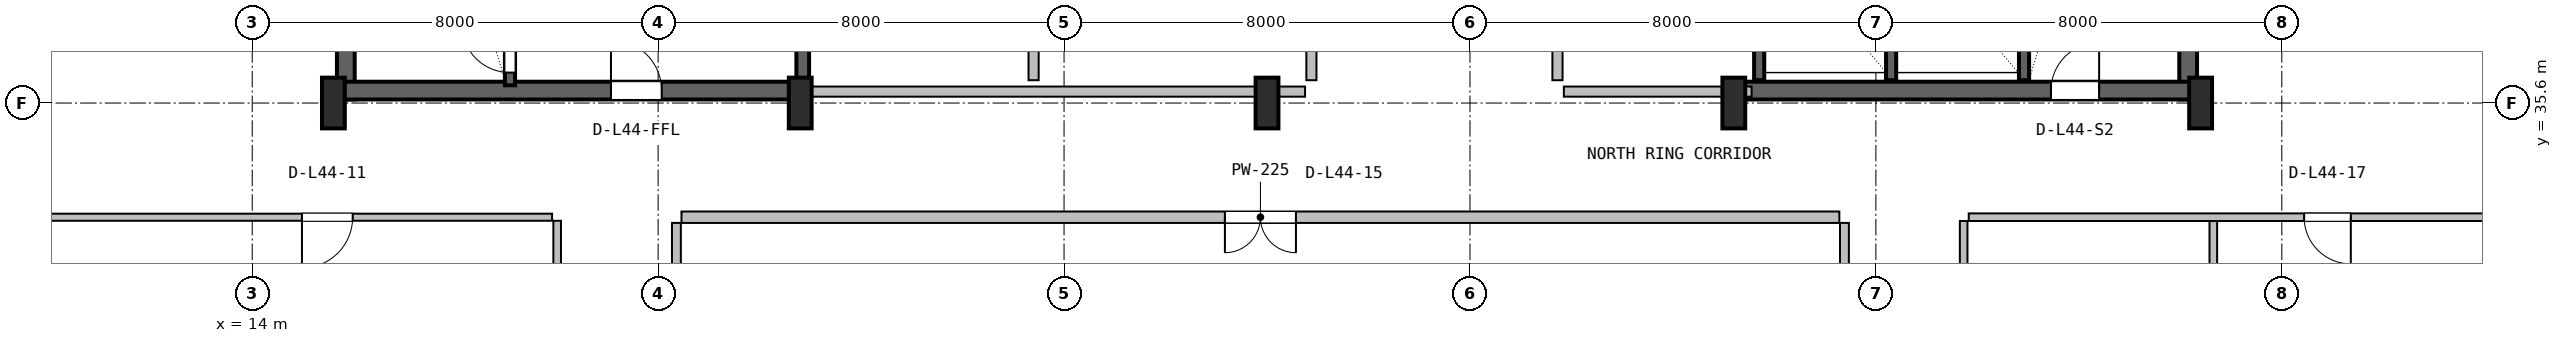
"""IFC4 building model, lengths in metres.
Left out: names, types, materials, properties, quantities, classifications, styles, units other than length and angle.
Written with IfcOpenShell. Run it as: python <this file> out.ifc"""

import sys

from ifc_helpers import new_model, si_unit, direction, frame, frame_2d, origin, origin_2d, place, context, subcontext, project, spatial, rectangle, i_section, extrude, source, transform, mapped, element, fill, save


model = new_model("IFC4")
c1 = context("Model", 3, precision=1e-05, world=origin(), true_north=direction((0.0, 1.0)))
c2 = subcontext(c1, "Body", "Model", "MODEL_VIEW")
j1 = project(units=[si_unit("LENGTHUNIT", "METRE"), si_unit("PLANEANGLEUNIT", "RADIAN")], contexts=[c1])
p1 = place(None, origin())
s1 = spatial("IfcSite", under=j1, at=p1, CompositionType="ELEMENT")
p2 = place(p1, origin())
s2 = spatial("IfcBuilding", under=s1, at=p2, CompositionType="ELEMENT")
p3 = place(p2, frame((0.0, 0.0, 180.0)))
s3 = spatial("IfcBuildingStorey", under=s2, at=p3, CompositionType="ELEMENT", Elevation=180.0)
for number, where, z_axis, x_axis in (
    (1, (15.845, 35.67, 0.0), (0.0, 0.0, 1.0), (0.0, 1.0, 0.0)),
    (2, (52.155, 35.67, 0.0), (0.0, 0.0, 1.0), (0.0, 1.0, 0.0)),
):
    element("IfcWall", number, at=place(p3, frame(where, z_axis=z_axis, x_axis=x_axis)), inside=s3, PredefinedType="SHEAR", context=c2, shape_type="SweptSolid", body=[
        extrude(rectangle(XDim=11.13, YDim=0.35, at=frame_2d((5.565, 0.0))), origin(), (0.0, 0.0, 1.0), 3.55),
    ])
p4 = place(p3, frame((15.67, 35.845, 0.0), z_axis=(0.0, 0.0, 1.0), x_axis=(1.0, 0.0, 0.0)))
e3 = element("IfcWall", 3, at=p4, inside=s3, PredefinedType="SHEAR", context=c2, shape_type="SweptSolid", body=[
    extrude(rectangle(XDim=9.13, YDim=0.35, at=frame_2d((4.565, 0.0))), origin(), (0.0, 0.0, 1.0), 3.55),
])
p5 = place(p4, frame((5.4, 0.0, 0.0)))
e4 = element("IfcOpeningElement", 4, at=p5, cuts=e3, PredefinedType="OPENING", context=c2, shape_type="SweptSolid", body=[
    extrude(rectangle(XDim=1.0, YDim=2.1, at=frame_2d((0.5, 1.05))), frame((0.0, 0.185, 0.0), z_axis=(0.0, -1.0, 0.0), x_axis=(1.0, 0.0, 0.0)), (0.0, 0.0, 1.0), 0.37),
])
p6 = place(p3, frame((43.2, 35.845, 0.0), z_axis=(0.0, 0.0, 1.0), x_axis=(1.0, 0.0, 0.0)))
e5 = element("IfcWall", 5, at=p6, inside=s3, PredefinedType="SHEAR", context=c2, shape_type="SweptSolid", body=[
    extrude(rectangle(XDim=9.13, YDim=0.35, at=frame_2d((4.565, 0.0))), origin(), (0.0, 0.0, 1.0), 3.55),
])
p7 = place(p6, frame((6.25, 0.0, 0.0)))
e6 = element("IfcOpeningElement", 6, at=p7, cuts=e5, PredefinedType="OPENING", context=c2, shape_type="SweptSolid", body=[
    extrude(rectangle(XDim=0.95, YDim=2.1, at=frame_2d((0.475, 1.05))), frame((0.0, 0.185, 0.0), z_axis=(0.0, -1.0, 0.0), x_axis=(1.0, 0.0, 0.0)), (0.0, 0.0, 1.0), 0.37),
])
m1 = source(origin(), c2, "Body", "SweptSolid", [
    extrude(i_section(OverallWidth=0.45, OverallDepth=1.0, WebThickness=0.016, FlangeThickness=0.03, FilletRadius=0.016, at=origin_2d()), origin(), (0.0, 0.0, 1.0), 3.8),
])
for number, where, z_axis, x_axis in (
    (7, (15.6, 35.6, 0.0), (0.0, 0.0, 1.0), (1.0, 0.0, 0.0)),
    (8, (24.8, 35.6, 0.0), (0.0, 0.0, 1.0), (1.0, 0.0, 0.0)),
    (9, (34.0, 35.6, 0.0), (0.0, 0.0, 1.0), (1.0, 0.0, 0.0)),
    (10, (43.2, 35.6, 0.0), (0.0, 0.0, 1.0), (1.0, 0.0, 0.0)),
    (11, (52.4, 35.6, 0.0), (0.0, 0.0, 1.0), (1.0, 0.0, 0.0)),
):
    element("IfcColumn", number, at=place(p3, frame(where, z_axis=z_axis, x_axis=x_axis)), inside=s3, PredefinedType="COLUMN", context=c2, shape_type="MappedRepresentation", body=[
        mapped(m1, transform((0.0, 0.0, 0.0), x_axis=(1.0, 0.0, 0.0), y_axis=(0.0, 1.0, 0.0), z_axis=(0.0, 0.0, 1.0), scale=1.0)),
    ])
p8 = place(p3, frame((19.08, 35.95, 0.0), z_axis=(0.0, 0.0, 1.0), x_axis=(0.0, 1.0, 0.0)))
e12 = element("IfcWall", 12, at=p8, inside=s3, PredefinedType="SHEAR", context=c2, shape_type="SweptSolid", body=[
    extrude(rectangle(XDim=9.65, YDim=0.2, at=frame_2d((4.825, 0.0))), origin(), (0.0, 0.0, 1.0), 3.55),
])
p9 = place(p8, frame((0.25, 0.0, 0.0)))
e13 = element("IfcOpeningElement", 13, at=p9, cuts=e12, PredefinedType="OPENING", context=c2, shape_type="SweptSolid", body=[
    extrude(rectangle(XDim=0.95, YDim=2.1, at=frame_2d((0.475, 1.05))), frame((0.0, 0.11, 0.0), z_axis=(0.0, -1.0, 0.0), x_axis=(1.0, 0.0, 0.0)), (0.0, 0.0, 1.0), 0.22),
])
p10 = place(p3, frame((24.85, 36.05, 0.0), z_axis=(0.0, 0.0, 1.0), x_axis=(0.0, 1.0, 0.0)))
e14 = element("IfcWall", 14, at=p10, inside=s3, PredefinedType="SHEAR", context=c2, shape_type="SweptSolid", body=[
    extrude(rectangle(XDim=10.45, YDim=0.25, at=frame_2d((5.225, 0.0))), origin(), (0.0, 0.0, 1.0), 3.55),
])
p11 = place(p3, frame((48.92, 36.05, 0.0), z_axis=(0.0, 0.0, 1.0), x_axis=(0.0, 1.0, 0.0)))
e15 = element("IfcWall", 15, at=p11, inside=s3, PredefinedType="SHEAR", context=c2, shape_type="SweptSolid", body=[
    extrude(rectangle(XDim=10.5, YDim=0.2, at=frame_2d((5.25, 0.0))), origin(), (0.0, 0.0, 1.0), 3.55),
])
for number, where, z_axis, x_axis in (
    (16, (43.7, 36.05, 0.0), (0.0, 0.0, 1.0), (0.0, 1.0, 0.0)),
    (17, (46.3, 36.05, 0.0), (0.0, 0.0, 1.0), (0.0, 1.0, 0.0)),
):
    element("IfcWall", number, at=place(p3, frame(where, z_axis=z_axis, x_axis=x_axis)), inside=s3, PredefinedType="SHEAR", context=c2, shape_type="SweptSolid", body=[
        extrude(rectangle(XDim=3.05, YDim=0.2, at=frame_2d((1.525, 0.0))), origin(), (0.0, 0.0, 1.0), 3.55),
    ])
p12 = place(p3, frame((25.0, 35.825, 0.0), z_axis=(0.0, 0.0, 1.0), x_axis=(1.0, 0.0, 0.0)))
e18 = element("IfcWall", 18, at=p12, inside=s3, PredefinedType="PLUMBINGWALL", context=c2, shape_type="SweptSolid", body=[
    extrude(rectangle(XDim=9.75, YDim=0.2, at=frame_2d((4.875, 0.0))), origin(), (0.0, 0.0, 1.0), 2.575),
])
for number, where, z_axis, x_axis in (
    (19, (29.4, 36.05, 0.0), (0.0, 0.0, 1.0), (0.0, 1.0, 0.0)),
    (20, (34.875, 36.05, 0.0), (0.0, 0.0, 1.0), (0.0, 1.0, 0.0)),
):
    element("IfcWall", number, at=place(p3, frame(where, z_axis=z_axis, x_axis=x_axis)), inside=s3, PredefinedType="PLUMBINGWALL", context=c2, shape_type="SweptSolid", body=[
        extrude(rectangle(XDim=3.1, YDim=0.2, at=frame_2d((1.55, 0.0))), origin(), (0.0, 0.0, 1.0), 3.53),
    ])
p13 = place(p3, frame((39.85, 35.825, 0.0), z_axis=(0.0, 0.0, 1.0), x_axis=(1.0, 0.0, 0.0)))
e21 = element("IfcWall", 21, at=p13, inside=s3, PredefinedType="SOLIDWALL", context=c2, shape_type="SweptSolid", body=[
    extrude(rectangle(XDim=3.7, YDim=0.2, at=frame_2d((1.85, 0.0))), origin(), (0.0, 0.0, 1.0), 2.575),
])
p14 = place(p3, frame((39.725, 36.05, 0.0), z_axis=(0.0, 0.0, 1.0), x_axis=(0.0, 1.0, 0.0)))
e22 = element("IfcWall", 22, at=p14, inside=s3, PredefinedType="SOLIDWALL", context=c2, shape_type="SweptSolid", body=[
    extrude(rectangle(XDim=3.1, YDim=0.2, at=frame_2d((1.55, 0.0))), origin(), (0.0, 0.0, 1.0), 3.53),
])
p15 = place(p3, frame((20.01, 15.06, 0.0), z_axis=(0.0, 0.0, 1.0), x_axis=(0.0, 1.0, 0.0)))
e23 = element("IfcWall", 23, at=p15, inside=s3, PredefinedType="PARTITIONING", context=c2, shape_type="SweptSolid", body=[
    extrude(rectangle(XDim=18.22, YDim=0.15, at=frame_2d((9.11, 0.0))), origin(), (0.0, 0.0, 1.0), 3.222),
])
p16 = place(p15, frame((1.67, 0.0, 0.0)))
e24 = element("IfcOpeningElement", 24, at=p16, cuts=e23, PredefinedType="OPENING", context=c2, shape_type="SweptSolid", body=[
    extrude(rectangle(XDim=0.88, YDim=2.06, at=frame_2d((0.44, 1.03))), frame((0.0, 0.085, 0.0), z_axis=(0.0, -1.0, 0.0), x_axis=(1.0, 0.0, 0.0)), (0.0, 0.0, 1.0), 0.17),
])
p17 = place(p15, frame((6.855, 0.0, 0.0)))
e25 = element("IfcOpeningElement", 25, at=p17, cuts=e23, PredefinedType="OPENING", context=c2, shape_type="SweptSolid", body=[
    extrude(rectangle(XDim=0.92, YDim=2.08, at=frame_2d((0.46, 1.04))), frame((0.0, 0.085, 0.0), z_axis=(0.0, -1.0, 0.0), x_axis=(1.0, 0.0, 0.0)), (0.0, 0.0, 1.0), 0.17),
])
p18 = place(p3, frame((7.18, 33.35, 0.0), z_axis=(0.0, 0.0, 1.0), x_axis=(1.0, 0.0, 0.0)))
e26 = element("IfcWall", 26, at=p18, inside=s3, PredefinedType="PARTITIONING", context=c2, shape_type="SweptSolid", body=[
    extrude(rectangle(XDim=12.73, YDim=0.14, at=frame_2d((6.365, 0.0))), origin(), (0.0, 0.0, 1.0), 3.108),
])
p19 = place(p18, frame((7.8, 0.0, 0.0)))
e27 = element("IfcOpeningElement", 27, at=p19, cuts=e26, PredefinedType="OPENING", context=c2, shape_type="SweptSolid", body=[
    extrude(rectangle(XDim=1.0, YDim=2.1, at=frame_2d((0.5, 1.05))), frame((0.0, 0.08, 0.0), z_axis=(0.0, -1.0, 0.0), x_axis=(1.0, 0.0, 0.0)), (0.0, 0.0, 1.0), 0.16),
])
p20 = place(p3, frame((45.38, 17.427, 0.0), z_axis=(0.0, 0.0, 1.0), x_axis=(0.0, 1.0, 0.0)))
e28 = element("IfcWall", 28, at=p20, inside=s3, PredefinedType="PARTITIONING", context=c2, shape_type="SweptSolid", body=[
    extrude(rectangle(XDim=15.811, YDim=0.175, at=frame_2d((7.906, 0.0))), origin(), (0.0, 0.0, 1.0), 3.222),
])
p21 = place(p20, frame((5.998, 0.0, 0.0)))
e29 = element("IfcOpeningElement", 29, at=p21, cuts=e28, PredefinedType="OPENING", context=c2, shape_type="SweptSolid", body=[
    extrude(rectangle(XDim=1.05, YDim=2.1, at=frame_2d((0.525, 1.05))), frame((0.0, 0.098, 0.0), z_axis=(0.0, -1.0, 0.0), x_axis=(1.0, 0.0, 0.0)), (0.0, 0.0, 1.0), 0.195),
])
p22 = place(p20, frame((9.948, 0.0, 0.0)))
e30 = element("IfcOpeningElement", 30, at=p22, cuts=e28, PredefinedType="OPENING", context=c2, shape_type="SweptSolid", body=[
    extrude(rectangle(XDim=1.05, YDim=2.1, at=frame_2d((0.525, 1.05))), frame((0.0, 0.098, 0.0), z_axis=(0.0, -1.0, 0.0), x_axis=(1.0, 0.0, 0.0)), (0.0, 0.0, 1.0), 0.195),
])
p23 = place(p3, frame((22.36, 17.427, 0.0), z_axis=(0.0, 0.0, 1.0), x_axis=(0.0, 1.0, 0.0)))
e31 = element("IfcWall", 31, at=p23, inside=s3, PredefinedType="PARTITIONING", context=c2, shape_type="SweptSolid", body=[
    extrude(rectangle(XDim=15.811, YDim=0.175, at=frame_2d((7.906, 0.0))), origin(), (0.0, 0.0, 1.0), 3.222),
])
p24 = place(p3, frame((22.46, 33.35, 0.0), z_axis=(0.0, 0.0, 1.0), x_axis=(1.0, 0.0, 0.0)))
e32 = element("IfcWall", 32, at=p24, inside=s3, PredefinedType="PARTITIONING", context=c2, shape_type="SweptSolid", body=[
    extrude(rectangle(XDim=22.82, YDim=0.225, at=frame_2d((11.41, 0.0))), origin(), (0.0, 0.0, 1.0), 2.909),
])
p25 = place(p24, frame((10.71, 0.0, 0.0)))
e33 = element("IfcOpeningElement", 33, at=p25, cuts=e32, PredefinedType="OPENING", context=c2, shape_type="SweptSolid", body=[
    extrude(rectangle(XDim=1.4, YDim=2.12, at=frame_2d((0.7, 1.06))), frame((0.0, 0.123, 0.0), z_axis=(0.0, -1.0, 0.0), x_axis=(1.0, 0.0, 0.0)), (0.0, 0.0, 1.0), 0.245),
])
p26 = place(p3, frame((52.65, 15.06, 0.0), z_axis=(0.0, 0.0, 1.0), x_axis=(0.0, 1.0, 0.0)))
e34 = element("IfcWall", 34, at=p26, inside=s3, PredefinedType="PARTITIONING", context=c2, shape_type="SweptSolid", body=[
    extrude(rectangle(XDim=18.215, YDim=0.15, at=frame_2d((9.107, 0.0))), origin(), (0.0, 0.0, 1.0), 3.222),
])
p27 = place(p3, frame((47.83, 33.35, 0.0), z_axis=(0.0, 0.0, 1.0), x_axis=(1.0, 0.0, 0.0)))
e35 = element("IfcWall", 35, at=p27, inside=s3, PredefinedType="PARTITIONING", context=c2, shape_type="SweptSolid", body=[
    extrude(rectangle(XDim=12.99, YDim=0.15, at=frame_2d((6.495, 0.0))), origin(), (0.0, 0.0, 1.0), 3.108),
])
p28 = place(p27, frame((6.61, 0.0, 0.0)))
e36 = element("IfcOpeningElement", 36, at=p28, cuts=e35, PredefinedType="OPENING", context=c2, shape_type="SweptSolid", body=[
    extrude(rectangle(XDim=0.92, YDim=2.08, at=frame_2d((0.46, 1.04))), frame((0.0, 0.085, 0.0), z_axis=(0.0, -1.0, 0.0), x_axis=(1.0, 0.0, 0.0)), (0.0, 0.0, 1.0), 0.17),
])
p29 = place(p3, frame((47.73, 15.06, 0.0), z_axis=(0.0, 0.0, 1.0), x_axis=(0.0, 1.0, 0.0)))
e37 = element("IfcWall", 37, at=p29, inside=s3, PredefinedType="PARTITIONING", context=c2, shape_type="SweptSolid", body=[
    extrude(rectangle(XDim=18.215, YDim=0.15, at=frame_2d((9.107, 0.0))), origin(), (0.0, 0.0, 1.0), 3.222),
])
p30 = place(p29, frame((8.67, 0.0, 0.0)))
e38 = element("IfcOpeningElement", 38, at=p30, cuts=e37, PredefinedType="OPENING", context=c2, shape_type="SweptSolid", body=[
    extrude(rectangle(XDim=0.88, YDim=2.06, at=frame_2d((0.44, 1.03))), frame((0.0, 0.085, 0.0), z_axis=(0.0, -1.0, 0.0), x_axis=(1.0, 0.0, 0.0)), (0.0, 0.0, 1.0), 0.17),
])
m2 = source(origin(), c2, "Body", "SweptSolid", [
    extrude(rectangle(XDim=0.95, YDim=2.1, at=frame_2d((0.475, 1.05))), frame((0.0, 0.025, 0.0), z_axis=(0.0, -1.0, 0.0), x_axis=(1.0, 0.0, 0.0)), (0.0, 0.0, 1.0), 0.05),
])
p31 = place(p9, origin())
e39 = element("IfcDoor", 39, at=p31, inside=s3, OperationType="SINGLE_SWING_RIGHT", PredefinedType="DOOR", context=c2, shape_type="MappedRepresentation", body=[
    mapped(m2, transform((0.0, 0.0, 0.0), x_axis=(1.0, 0.0, 0.0), y_axis=(0.0, 1.0, 0.0), z_axis=(0.0, 0.0, 1.0), scale=1.0)),
])
fill(e13, e39)
m3 = source(origin(), c2, "Body", "SweptSolid", [
    extrude(rectangle(XDim=1.0, YDim=2.1, at=frame_2d((0.5, 1.05))), frame((0.0, 0.025, 0.0), z_axis=(0.0, -1.0, 0.0), x_axis=(1.0, 0.0, 0.0)), (0.0, 0.0, 1.0), 0.05),
])
p32 = place(p5, origin())
e40 = element("IfcDoor", 40, at=p32, inside=s3, OperationType="SINGLE_SWING_LEFT", PredefinedType="DOOR", context=c2, shape_type="MappedRepresentation", body=[
    mapped(m3, transform((0.0, 0.0, 0.0), x_axis=(1.0, 0.0, 0.0), y_axis=(0.0, 1.0, 0.0), z_axis=(0.0, 0.0, 1.0), scale=1.0)),
])
fill(e4, e40)
p33 = place(p7, origin())
e41 = element("IfcDoor", 41, at=p33, inside=s3, OperationType="SINGLE_SWING_RIGHT", PredefinedType="DOOR", context=c2, shape_type="MappedRepresentation", body=[
    mapped(m2, transform((0.0, 0.0, 0.0), x_axis=(1.0, 0.0, 0.0), y_axis=(0.0, 1.0, 0.0), z_axis=(0.0, 0.0, 1.0), scale=1.0)),
])
fill(e6, e41)
m4 = source(origin(), c2, "Body", "SweptSolid", [
    extrude(rectangle(XDim=1.0, YDim=2.1, at=frame_2d((0.5, 1.05))), frame((0.0, 0.025, 0.0), z_axis=(0.0, -1.0, 0.0), x_axis=(1.0, 0.0, 0.0)), (0.0, 0.0, 1.0), 0.05),
])
p34 = place(p19, frame((1.0, 0.0, 0.0), z_axis=(0.0, 0.0, 1.0), x_axis=(-1.0, 0.0, 0.0)))
e42 = element("IfcDoor", 42, at=p34, inside=s3, OperationType="SINGLE_SWING_LEFT", PredefinedType="DOOR", context=c2, shape_type="MappedRepresentation", body=[
    mapped(m4, transform((0.0, 0.0, 0.0), x_axis=(1.0, 0.0, 0.0), y_axis=(0.0, 1.0, 0.0), z_axis=(0.0, 0.0, 1.0), scale=1.0)),
])
fill(e27, e42)
m5 = source(origin(), c2, "Body", "SweptSolid", [
    extrude(rectangle(XDim=1.4, YDim=2.12, at=frame_2d((0.7, 1.06))), frame((0.0, 0.025, 0.0), z_axis=(0.0, -1.0, 0.0), x_axis=(1.0, 0.0, 0.0)), (0.0, 0.0, 1.0), 0.05),
])
p35 = place(p25, frame((1.4, 0.0, 0.0), z_axis=(0.0, 0.0, 1.0), x_axis=(-1.0, 0.0, 0.0)))
e43 = element("IfcDoor", 43, at=p35, inside=s3, OperationType="DOUBLE_DOOR_SINGLE_SWING", PredefinedType="DOOR", context=c2, shape_type="MappedRepresentation", body=[
    mapped(m5, transform((0.0, 0.0, 0.0), x_axis=(1.0, 0.0, 0.0), y_axis=(0.0, 1.0, 0.0), z_axis=(0.0, 0.0, 1.0), scale=1.0)),
])
fill(e33, e43)
m6 = source(origin(), c2, "Body", "SweptSolid", [
    extrude(rectangle(XDim=0.92, YDim=2.08, at=frame_2d((0.46, 1.04))), frame((0.0, 0.025, 0.0), z_axis=(0.0, -1.0, 0.0), x_axis=(1.0, 0.0, 0.0)), (0.0, 0.0, 1.0), 0.05),
])
p36 = place(p28, frame((0.92, 0.0, 0.0), z_axis=(0.0, 0.0, 1.0), x_axis=(-1.0, 0.0, 0.0)))
e44 = element("IfcDoor", 44, at=p36, inside=s3, OperationType="SINGLE_SWING_RIGHT", PredefinedType="DOOR", context=c2, shape_type="MappedRepresentation", body=[
    mapped(m6, transform((0.0, 0.0, 0.0), x_axis=(1.0, 0.0, 0.0), y_axis=(0.0, 1.0, 0.0), z_axis=(0.0, 0.0, 1.0), scale=1.0)),
])
fill(e36, e44)
save(model, sys.argv[1])
